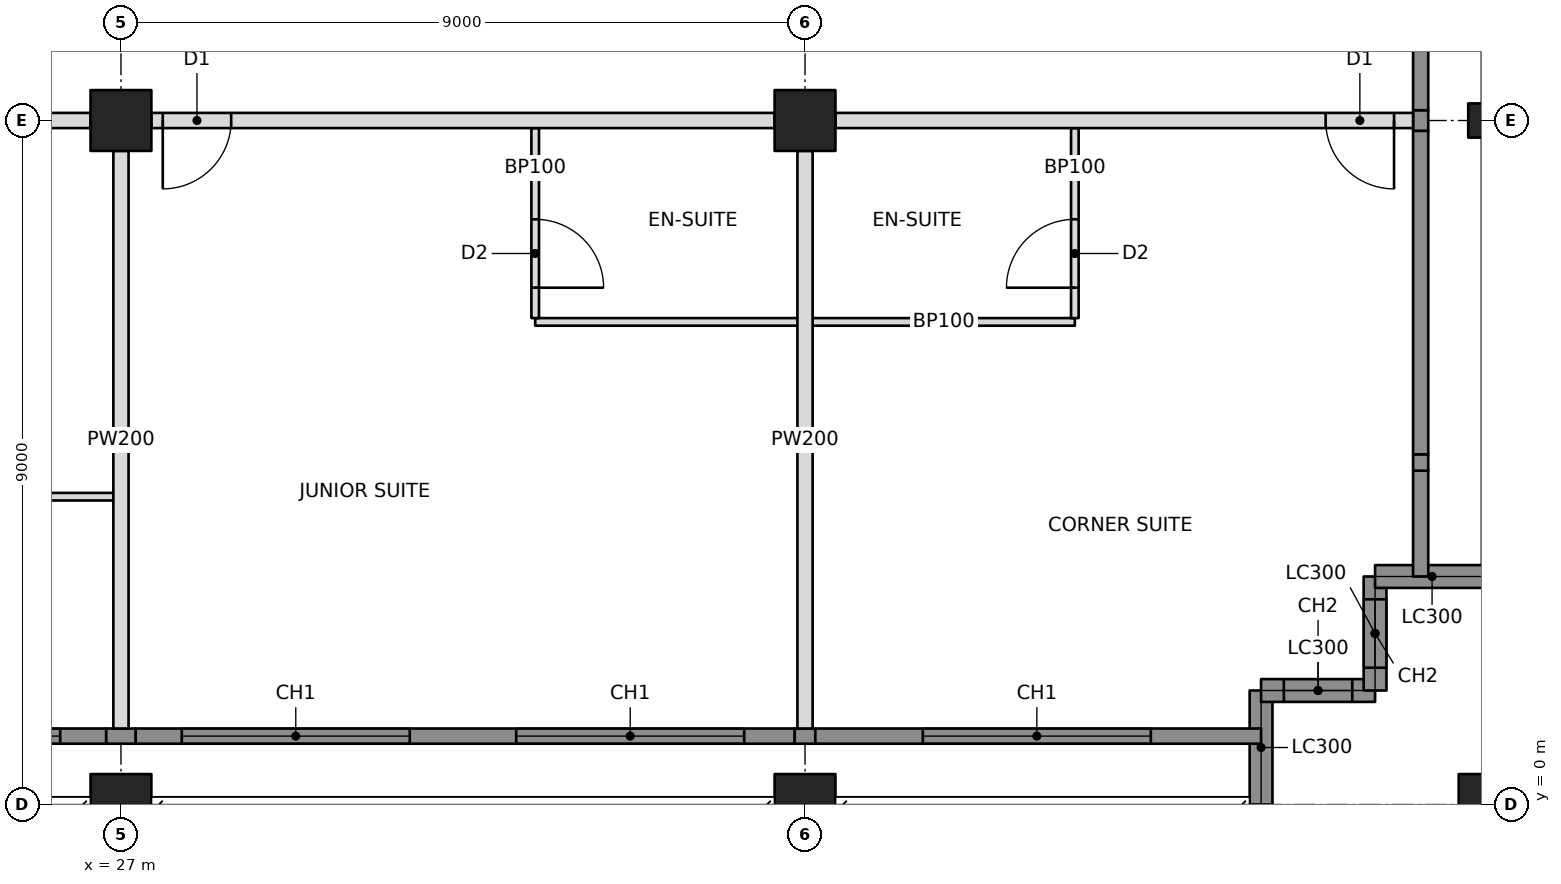
"""IFC4 building model, lengths in metres.
Left out: names, types, materials, properties, quantities, classifications, styles, units other than length and angle.
Written with IfcOpenShell. Run it as: python <this file> out.ifc"""

import sys

from ifc_helpers import new_model, si_unit, direction, frame, frame_2d, origin, origin_2d, place, context, subcontext, project, spatial, rectangle, hollow_rectangle, i_section, extrude, element, fill, save


model = new_model("IFC4")
c1 = context("Model", 3, precision=1e-05, world=origin(), true_north=direction((0.0, 1.0)))
c2 = subcontext(c1, "Body", "Model", "MODEL_VIEW")
j1 = project(units=[si_unit("LENGTHUNIT", "METRE"), si_unit("PLANEANGLEUNIT", "RADIAN")], contexts=[c1])
p1 = place(None, origin())
s1 = spatial("IfcSite", under=j1, at=p1, CompositionType="ELEMENT")
p2 = place(p1, origin())
s2 = spatial("IfcBuilding", under=s1, at=p2, CompositionType="ELEMENT")
p3 = place(p2, frame((0.0, 0.0, 191.0)))
s3 = spatial("IfcBuildingStorey", under=s2, at=p3, CompositionType="ELEMENT", Elevation=191.0)
p4 = place(p3, frame((27.0, 0.0, 0.0), z_axis=(0.0, 0.0, 1.0), x_axis=(1.0, 0.0, 0.0)))
e1 = element("IfcColumn", 1, at=p4, inside=s3, PredefinedType="COLUMN", context=c2, shape_type="SweptSolid", body=[
    extrude(hollow_rectangle(XDim=0.8, YDim=0.8, WallThickness=0.07, at=origin_2d()), origin(), (0.0, 0.0, 1.0), 3.4),
])
p5 = place(p3, frame((27.0, 9.0, 0.0), z_axis=(0.0, 0.0, 1.0), x_axis=(1.0, 0.0, 0.0)))
e2 = element("IfcColumn", 2, at=p5, inside=s3, PredefinedType="COLUMN", context=c2, shape_type="SweptSolid", body=[
    extrude(hollow_rectangle(XDim=0.8, YDim=0.8, WallThickness=0.06, at=origin_2d()), origin(), (0.0, 0.0, 1.0), 3.4),
])
p6 = place(p3, frame((36.0, 0.0, 0.0), z_axis=(0.0, 0.0, 1.0), x_axis=(1.0, 0.0, 0.0)))
e3 = element("IfcColumn", 3, at=p6, inside=s3, PredefinedType="COLUMN", context=c2, shape_type="SweptSolid", body=[
    extrude(hollow_rectangle(XDim=0.8, YDim=0.8, WallThickness=0.07, at=origin_2d()), origin(), (0.0, 0.0, 1.0), 3.4),
])
p7 = place(p3, frame((36.0, 9.0, 0.0), z_axis=(0.0, 0.0, 1.0), x_axis=(0.0, 1.0, 0.0)))
e4 = element("IfcColumn", 4, at=p7, inside=s3, PredefinedType="COLUMN", context=c2, shape_type="SweptSolid", body=[
    extrude(hollow_rectangle(XDim=0.8, YDim=0.8, WallThickness=0.06, at=origin_2d()), origin(), (0.0, 0.0, 1.0), 3.4),
])
p8 = place(p3, frame((45.0, 0.0, 0.0), z_axis=(0.0, 0.0, 1.0), x_axis=(1.0, 0.0, 0.0)))
e5 = element("IfcColumn", 5, at=p8, inside=s3, PredefinedType="COLUMN", context=c2, shape_type="SweptSolid", body=[
    extrude(hollow_rectangle(XDim=0.8, YDim=0.8, WallThickness=0.07, at=origin_2d()), origin(), (0.0, 0.0, 1.0), 3.4),
])
p9 = place(p3, frame((45.0, 9.0, 0.0), z_axis=(0.0, 0.0, 1.0), x_axis=(0.0, 1.0, 0.0)))
e6 = element("IfcColumn", 6, at=p9, inside=s3, PredefinedType="COLUMN", context=c2, shape_type="SweptSolid", body=[
    extrude(i_section(OverallWidth=0.449, OverallDepth=0.549, WebThickness=0.072, FlangeThickness=0.115, at=origin_2d()), origin(), (0.0, 0.0, 1.0), 3.4),
])
p10 = place(p3, frame((42.0, 0.0, 0.0), z_axis=(0.0, 0.0, 1.0), x_axis=(0.0, 1.0, 0.0)))
e7 = element("IfcWall", 7, at=p10, inside=s3, PredefinedType="SOLIDWALL", context=c2, shape_type="SweptSolid", body=[
    extrude(rectangle(XDim=1.5, YDim=0.3, at=frame_2d((0.75, 0.0))), origin(), (0.0, 0.0, 1.0), 2.42),
])
p11 = place(p3, frame((42.0, 1.5, 0.0), z_axis=(0.0, 0.0, 1.0), x_axis=(1.0, 0.0, 0.0)))
e8 = element("IfcWall", 8, at=p11, inside=s3, PredefinedType="SOLIDWALL", context=c2, shape_type="SweptSolid", body=[
    extrude(rectangle(XDim=1.5, YDim=0.3, at=frame_2d((0.75, 0.0))), origin(), (0.0, 0.0, 1.0), 3.2),
])
p12 = place(p11, frame((0.3, 0.0, 0.6)))
e9 = element("IfcOpeningElement", 9, at=p12, cuts=e8, PredefinedType="OPENING", context=c2, shape_type="SweptSolid", body=[
    extrude(rectangle(XDim=0.9, YDim=2.2, at=frame_2d((0.45, 1.1))), frame((0.0, 0.16, 0.0), z_axis=(0.0, -1.0, 0.0), x_axis=(1.0, 0.0, 0.0)), (0.0, 0.0, 1.0), 0.32),
])
p13 = place(p3, frame((43.5, 1.5, 0.0), z_axis=(0.0, 0.0, 1.0), x_axis=(0.0, 1.0, 0.0)))
e10 = element("IfcWall", 10, at=p13, inside=s3, PredefinedType="SOLIDWALL", context=c2, shape_type="SweptSolid", body=[
    extrude(rectangle(XDim=1.5, YDim=0.3, at=frame_2d((0.75, 0.0))), origin(), (0.0, 0.0, 1.0), 3.2),
])
p14 = place(p13, frame((0.3, 0.0, 0.6)))
e11 = element("IfcOpeningElement", 11, at=p14, cuts=e10, PredefinedType="OPENING", context=c2, shape_type="SweptSolid", body=[
    extrude(rectangle(XDim=0.9, YDim=2.2, at=frame_2d((0.45, 1.1))), frame((0.0, 0.16, 0.0), z_axis=(0.0, -1.0, 0.0), x_axis=(1.0, 0.0, 0.0)), (0.0, 0.0, 1.0), 0.32),
])
p15 = place(p3, frame((43.5, 3.0, 0.0), z_axis=(0.0, 0.0, 1.0), x_axis=(1.0, 0.0, 0.0)))
e12 = element("IfcWall", 12, at=p15, inside=s3, PredefinedType="SOLIDWALL", context=c2, shape_type="SweptSolid", body=[
    extrude(rectangle(XDim=1.5, YDim=0.3, at=frame_2d((0.75, 0.0))), origin(), (0.0, 0.0, 1.0), 2.42),
])
p16 = place(p3, frame((44.1, 3.0, 0.0), z_axis=(0.0, 0.0, 1.0), x_axis=(0.0, 1.0, 0.0)))
e13 = element("IfcWall", 13, at=p16, inside=s3, PredefinedType="SOLIDWALL", context=c2, shape_type="SweptSolid", body=[
    extrude(rectangle(XDim=1.393, YDim=0.2, at=frame_2d((0.696, 0.0))), origin(), (0.0, 0.0, 1.0), 3.2),
])
p17 = place(p3, frame((18.4, 9.0, 0.0), z_axis=(0.0, 0.0, 1.0), x_axis=(1.0, 0.0, 0.0)))
e14 = element("IfcWall", 14, at=p17, inside=s3, PredefinedType="PARTITIONING", context=c2, shape_type="SweptSolid", body=[
    extrude(rectangle(XDim=8.2, YDim=0.2, at=frame_2d((4.1, 0.0))), origin(), (0.0, 0.0, 1.0), 2.405),
])
p18 = place(p17, frame((0.15, 0.0, 0.0)))
e15 = element("IfcOpeningElement", 15, at=p18, cuts=e14, PredefinedType="OPENING", context=c2, shape_type="SweptSolid", body=[
    extrude(rectangle(XDim=0.9, YDim=2.1, at=frame_2d((0.45, 1.05))), frame((0.0, 0.11, 0.0), z_axis=(0.0, -1.0, 0.0), x_axis=(1.0, 0.0, 0.0)), (0.0, 0.0, 1.0), 0.22),
])
p19 = place(p3, frame((27.4, 9.0, 0.0), z_axis=(0.0, 0.0, 1.0), x_axis=(1.0, 0.0, 0.0)))
e16 = element("IfcWall", 16, at=p19, inside=s3, PredefinedType="PARTITIONING", context=c2, shape_type="SweptSolid", body=[
    extrude(rectangle(XDim=8.2, YDim=0.2, at=frame_2d((4.1, 0.0))), origin(), (0.0, 0.0, 1.0), 2.405),
])
p20 = place(p19, frame((0.15, 0.0, 0.0)))
e17 = element("IfcOpeningElement", 17, at=p20, cuts=e16, PredefinedType="OPENING", context=c2, shape_type="SweptSolid", body=[
    extrude(rectangle(XDim=0.9, YDim=2.1, at=frame_2d((0.45, 1.05))), frame((0.0, 0.11, 0.0), z_axis=(0.0, -1.0, 0.0), x_axis=(1.0, 0.0, 0.0)), (0.0, 0.0, 1.0), 0.22),
])
p21 = place(p3, frame((36.4, 9.0, 0.0), z_axis=(0.0, 0.0, 1.0), x_axis=(1.0, 0.0, 0.0)))
e18 = element("IfcWall", 18, at=p21, inside=s3, PredefinedType="PARTITIONING", context=c2, shape_type="SweptSolid", body=[
    extrude(rectangle(XDim=7.6, YDim=0.2, at=frame_2d((3.8, 0.0))), origin(), (0.0, 0.0, 1.0), 2.438),
])
p22 = place(p21, frame((6.45, 0.0, 0.0)))
e19 = element("IfcOpeningElement", 19, at=p22, cuts=e18, PredefinedType="OPENING", context=c2, shape_type="SweptSolid", body=[
    extrude(rectangle(XDim=0.9, YDim=2.1, at=frame_2d((0.45, 1.05))), frame((0.0, 0.11, 0.0), z_axis=(0.0, -1.0, 0.0), x_axis=(1.0, 0.0, 0.0)), (0.0, 0.0, 1.0), 0.22),
])
p23 = place(p3, frame((27.0, 8.6, 0.0), z_axis=(0.0, 0.0, 1.0), x_axis=(0.0, -1.0, 0.0)))
e20 = element("IfcWall", 20, at=p23, inside=s3, PredefinedType="PARTITIONING", context=c2, shape_type="SweptSolid", body=[
    extrude(rectangle(XDim=7.6, YDim=0.2, at=frame_2d((3.8, 0.0))), origin(), (0.0, 0.0, 1.0), 2.405),
])
p24 = place(p3, frame((36.0, 8.6, 0.0), z_axis=(0.0, 0.0, 1.0), x_axis=(0.0, -1.0, 0.0)))
e21 = element("IfcWall", 21, at=p24, inside=s3, PredefinedType="PARTITIONING", context=c2, shape_type="SweptSolid", body=[
    extrude(rectangle(XDim=7.6, YDim=0.2, at=frame_2d((3.8, 0.0))), origin(), (0.0, 0.0, 1.0), 2.438),
])
p25 = place(p3, frame((22.5, 4.05, 0.0), z_axis=(0.0, 0.0, 1.0), x_axis=(1.0, 0.0, 0.0)))
e22 = element("IfcWall", 22, at=p25, inside=s3, PredefinedType="PARTITIONING", context=c2, shape_type="SweptSolid", body=[
    extrude(rectangle(XDim=4.4, YDim=0.1, at=frame_2d((2.2, 0.0))), origin(), (0.0, 0.0, 1.0), 2.404),
])
p26 = place(p25, frame((0.5, 0.0, 0.0)))
e23 = element("IfcOpeningElement", 23, at=p26, cuts=e22, PredefinedType="OPENING", context=c2, shape_type="SweptSolid", body=[
    extrude(rectangle(XDim=0.9, YDim=2.1, at=frame_2d((0.45, 1.05))), frame((0.0, 0.06, 0.0), z_axis=(0.0, -1.0, 0.0), x_axis=(1.0, 0.0, 0.0)), (0.0, 0.0, 1.0), 0.12),
])
p27 = place(p3, frame((32.45, 6.35, 0.0), z_axis=(0.0, 0.0, 1.0), x_axis=(1.0, 0.0, 0.0)))
e24 = element("IfcWall", 24, at=p27, inside=s3, PredefinedType="PARTITIONING", context=c2, shape_type="SweptSolid", body=[
    extrude(rectangle(XDim=3.45, YDim=0.1, at=frame_2d((1.725, 0.0))), origin(), (0.0, 0.0, 1.0), 2.438),
])
p28 = place(p3, frame((32.45, 8.9, 0.0), z_axis=(0.0, 0.0, 1.0), x_axis=(0.0, -1.0, 0.0)))
e25 = element("IfcWall", 25, at=p28, inside=s3, PredefinedType="PARTITIONING", context=c2, shape_type="SweptSolid", body=[
    extrude(rectangle(XDim=2.5, YDim=0.1, at=frame_2d((1.25, 0.0))), origin(), (0.0, 0.0, 1.0), 2.404),
])
p29 = place(p28, frame((1.2, 0.0, 0.0)))
e26 = element("IfcOpeningElement", 26, at=p29, cuts=e25, PredefinedType="OPENING", context=c2, shape_type="SweptSolid", body=[
    extrude(rectangle(XDim=0.9, YDim=2.1, at=frame_2d((0.45, 1.05))), frame((0.0, 0.06, 0.0), z_axis=(0.0, -1.0, 0.0), x_axis=(1.0, 0.0, 0.0)), (0.0, 0.0, 1.0), 0.12),
])
p30 = place(p3, frame((36.1, 6.35, 0.0), z_axis=(0.0, 0.0, 1.0), x_axis=(1.0, 0.0, 0.0)))
e27 = element("IfcWall", 27, at=p30, inside=s3, PredefinedType="PARTITIONING", context=c2, shape_type="SweptSolid", body=[
    extrude(rectangle(XDim=3.45, YDim=0.1, at=frame_2d((1.725, 0.0))), origin(), (0.0, 0.0, 1.0), 2.438),
])
p31 = place(p3, frame((39.55, 8.9, 0.0), z_axis=(0.0, 0.0, 1.0), x_axis=(0.0, -1.0, 0.0)))
e28 = element("IfcWall", 28, at=p31, inside=s3, PredefinedType="PARTITIONING", context=c2, shape_type="SweptSolid", body=[
    extrude(rectangle(XDim=2.5, YDim=0.1, at=frame_2d((1.25, 0.0))), origin(), (0.0, 0.0, 1.0), 2.438),
])
p32 = place(p31, frame((1.2, 0.0, 0.0)))
e29 = element("IfcOpeningElement", 29, at=p32, cuts=e28, PredefinedType="OPENING", context=c2, shape_type="SweptSolid", body=[
    extrude(rectangle(XDim=0.9, YDim=2.1, at=frame_2d((0.45, 1.05))), frame((0.0, 0.06, 0.0), z_axis=(0.0, -1.0, 0.0), x_axis=(1.0, 0.0, 0.0)), (0.0, 0.0, 1.0), 0.12),
])
p33 = place(p3, frame((18.194, 0.9, 0.0), z_axis=(0.0, 0.0, 1.0), x_axis=(1.0, 0.0, 0.0)))
e30 = element("IfcWall", 30, at=p33, inside=s3, PredefinedType="SOLIDWALL", context=c2, shape_type="SweptSolid", body=[
    extrude(rectangle(XDim=8.612, YDim=0.2, at=frame_2d((4.306, 0.0))), origin(), (0.0, 0.0, 1.0), 3.2),
])
p34 = place(p33, frame((0.606, 0.0, 0.6)))
e31 = element("IfcOpeningElement", 31, at=p34, cuts=e30, PredefinedType="OPENING", context=c2, shape_type="SweptSolid", body=[
    extrude(rectangle(XDim=3.0, YDim=2.2, at=frame_2d((1.5, 1.1))), frame((0.0, 0.11, 0.0), z_axis=(0.0, -1.0, 0.0), x_axis=(1.0, 0.0, 0.0)), (0.0, 0.0, 1.0), 0.22),
])
p35 = place(p33, frame((5.006, 0.0, 0.6)))
e32 = element("IfcOpeningElement", 32, at=p35, cuts=e30, PredefinedType="OPENING", context=c2, shape_type="SweptSolid", body=[
    extrude(rectangle(XDim=3.0, YDim=2.2, at=frame_2d((1.5, 1.1))), frame((0.0, 0.11, 0.0), z_axis=(0.0, -1.0, 0.0), x_axis=(1.0, 0.0, 0.0)), (0.0, 0.0, 1.0), 0.22),
])
p36 = place(p3, frame((26.806, 0.9, 0.0), z_axis=(0.0, 0.0, 1.0), x_axis=(1.0, 0.0, 0.0)))
e33 = element("IfcWall", 33, at=p36, inside=s3, PredefinedType="SOLIDWALL", context=c2, shape_type="SweptSolid", body=[
    extrude(rectangle(XDim=0.388, YDim=0.2, at=frame_2d((0.194, 0.0))), origin(), (0.0, 0.0, 1.0), 2.404),
])
p37 = place(p3, frame((27.194, 0.9, 0.0), z_axis=(0.0, 0.0, 1.0), x_axis=(1.0, 0.0, 0.0)))
e34 = element("IfcWall", 34, at=p37, inside=s3, PredefinedType="SOLIDWALL", context=c2, shape_type="SweptSolid", body=[
    extrude(rectangle(XDim=8.671, YDim=0.2, at=frame_2d((4.335, 0.0))), origin(), (0.0, 0.0, 1.0), 3.2),
])
p38 = place(p37, frame((0.606, 0.0, 0.6)))
e35 = element("IfcOpeningElement", 35, at=p38, cuts=e34, PredefinedType="OPENING", context=c2, shape_type="SweptSolid", body=[
    extrude(rectangle(XDim=3.0, YDim=2.2, at=frame_2d((1.5, 1.1))), frame((0.0, 0.11, 0.0), z_axis=(0.0, -1.0, 0.0), x_axis=(1.0, 0.0, 0.0)), (0.0, 0.0, 1.0), 0.22),
])
p39 = place(p37, frame((5.006, 0.0, 0.6)))
e36 = element("IfcOpeningElement", 36, at=p39, cuts=e34, PredefinedType="OPENING", context=c2, shape_type="SweptSolid", body=[
    extrude(rectangle(XDim=3.0, YDim=2.2, at=frame_2d((1.5, 1.1))), frame((0.0, 0.11, 0.0), z_axis=(0.0, -1.0, 0.0), x_axis=(1.0, 0.0, 0.0)), (0.0, 0.0, 1.0), 0.22),
])
p40 = place(p3, frame((35.865, 0.9, 0.0), z_axis=(0.0, 0.0, 1.0), x_axis=(1.0, 0.0, 0.0)))
e37 = element("IfcWall", 37, at=p40, inside=s3, PredefinedType="SOLIDWALL", context=c2, shape_type="SweptSolid", body=[
    extrude(rectangle(XDim=0.271, YDim=0.2, at=frame_2d((0.135, 0.0))), origin(), (0.0, 0.0, 1.0), 2.438),
])
p41 = place(p3, frame((36.135, 0.9, 0.0), z_axis=(0.0, 0.0, 1.0), x_axis=(1.0, 0.0, 0.0)))
e38 = element("IfcWall", 38, at=p41, inside=s3, PredefinedType="SOLIDWALL", context=c2, shape_type="SweptSolid", body=[
    extrude(rectangle(XDim=5.865, YDim=0.2, at=frame_2d((2.932, 0.0))), origin(), (0.0, 0.0, 1.0), 3.2),
])
p42 = place(p41, frame((1.415, 0.0, 0.6)))
e39 = element("IfcOpeningElement", 39, at=p42, cuts=e38, PredefinedType="OPENING", context=c2, shape_type="SweptSolid", body=[
    extrude(rectangle(XDim=3.0, YDim=2.2, at=frame_2d((1.5, 1.1))), frame((0.0, 0.11, 0.0), z_axis=(0.0, -1.0, 0.0), x_axis=(1.0, 0.0, 0.0)), (0.0, 0.0, 1.0), 0.22),
])
p43 = place(p3, frame((44.1, 4.393, 0.0), z_axis=(0.0, 0.0, 1.0), x_axis=(0.0, 1.0, 0.0)))
e40 = element("IfcWall", 40, at=p43, inside=s3, PredefinedType="SOLIDWALL", context=c2, shape_type="SweptSolid", body=[
    extrude(rectangle(XDim=0.215, YDim=0.2, at=frame_2d((0.107, 0.0))), origin(), (0.0, 0.0, 1.0), 2.661),
])
p44 = place(p3, frame((44.1, 4.607, 0.0), z_axis=(0.0, 0.0, 1.0), x_axis=(0.0, 1.0, 0.0)))
e41 = element("IfcWall", 41, at=p44, inside=s3, PredefinedType="SOLIDWALL", context=c2, shape_type="SweptSolid", body=[
    extrude(rectangle(XDim=4.257, YDim=0.2, at=frame_2d((2.129, 0.0))), origin(), (0.0, 0.0, 1.0), 3.2),
])
p45 = place(p3, frame((44.1, 8.865, 0.0), z_axis=(0.0, 0.0, 1.0), x_axis=(0.0, 1.0, 0.0)))
e42 = element("IfcWall", 42, at=p45, inside=s3, PredefinedType="SOLIDWALL", context=c2, shape_type="SweptSolid", body=[
    extrude(rectangle(XDim=0.271, YDim=0.2, at=frame_2d((0.135, 0.0))), origin(), (0.0, 0.0, 1.0), 2.438),
])
p46 = place(p3, frame((44.1, 9.135, 0.0), z_axis=(0.0, 0.0, 1.0), x_axis=(0.0, 1.0, 0.0)))
e43 = element("IfcWall", 43, at=p46, inside=s3, PredefinedType="SOLIDWALL", context=c2, shape_type="SweptSolid", body=[
    extrude(rectangle(XDim=8.671, YDim=0.2, at=frame_2d((4.335, 0.0))), origin(), (0.0, 0.0, 1.0), 3.2),
])
p47 = place(p46, frame((2.015, 0.0, 0.6)))
e44 = element("IfcOpeningElement", 44, at=p47, cuts=e43, PredefinedType="OPENING", context=c2, shape_type="SweptSolid", body=[
    extrude(rectangle(XDim=3.0, YDim=2.2, at=frame_2d((1.5, 1.1))), frame((0.0, 0.11, 0.0), z_axis=(0.0, -1.0, 0.0), x_axis=(1.0, 0.0, 0.0)), (0.0, 0.0, 1.0), 0.22),
])
p48 = place(p46, frame((5.515, 0.0, 0.6)))
e45 = element("IfcOpeningElement", 45, at=p48, cuts=e43, PredefinedType="OPENING", context=c2, shape_type="SweptSolid", body=[
    extrude(rectangle(XDim=3.0, YDim=2.2, at=frame_2d((1.5, 1.1))), frame((0.0, 0.11, 0.0), z_axis=(0.0, -1.0, 0.0), x_axis=(1.0, 0.0, 0.0)), (0.0, 0.0, 1.0), 0.22),
])
p49 = place(p12, origin())
e46 = element("IfcWindow", 46, at=p49, inside=s3, PartitioningType="SINGLE_PANEL", PredefinedType="WINDOW", context=c2, shape_type="SweptSolid", body=[
    extrude(rectangle(XDim=0.9, YDim=2.2, at=frame_2d((0.45, 1.1))), frame((0.0, 0.03, 0.0), z_axis=(0.0, -1.0, 0.0), x_axis=(1.0, 0.0, 0.0)), (0.0, 0.0, 1.0), 0.06),
])
fill(e9, e46)
p50 = place(p14, origin())
e47 = element("IfcWindow", 47, at=p50, inside=s3, PartitioningType="SINGLE_PANEL", PredefinedType="WINDOW", context=c2, shape_type="SweptSolid", body=[
    extrude(rectangle(XDim=0.9, YDim=2.2, at=frame_2d((0.45, 1.1))), frame((0.0, 0.03, 0.0), z_axis=(0.0, -1.0, 0.0), x_axis=(1.0, 0.0, 0.0)), (0.0, 0.0, 1.0), 0.06),
])
fill(e11, e47)
p51 = place(p35, origin())
e48 = element("IfcWindow", 48, at=p51, inside=s3, PartitioningType="TRIPLE_PANEL_VERTICAL", PredefinedType="WINDOW", context=c2, shape_type="SweptSolid", body=[
    extrude(rectangle(XDim=3.0, YDim=2.2, at=frame_2d((1.5, 1.1))), frame((0.0, 0.03, 0.0), z_axis=(0.0, -1.0, 0.0), x_axis=(1.0, 0.0, 0.0)), (0.0, 0.0, 1.0), 0.06),
])
fill(e32, e48)
p52 = place(p38, origin())
e49 = element("IfcWindow", 49, at=p52, inside=s3, PartitioningType="TRIPLE_PANEL_VERTICAL", PredefinedType="WINDOW", context=c2, shape_type="SweptSolid", body=[
    extrude(rectangle(XDim=3.0, YDim=2.2, at=frame_2d((1.5, 1.1))), frame((0.0, 0.03, 0.0), z_axis=(0.0, -1.0, 0.0), x_axis=(1.0, 0.0, 0.0)), (0.0, 0.0, 1.0), 0.06),
])
fill(e35, e49)
p53 = place(p39, origin())
e50 = element("IfcWindow", 50, at=p53, inside=s3, PartitioningType="TRIPLE_PANEL_VERTICAL", PredefinedType="WINDOW", context=c2, shape_type="SweptSolid", body=[
    extrude(rectangle(XDim=3.0, YDim=2.2, at=frame_2d((1.5, 1.1))), frame((0.0, 0.03, 0.0), z_axis=(0.0, -1.0, 0.0), x_axis=(1.0, 0.0, 0.0)), (0.0, 0.0, 1.0), 0.06),
])
fill(e36, e50)
p54 = place(p42, origin())
e51 = element("IfcWindow", 51, at=p54, inside=s3, PartitioningType="TRIPLE_PANEL_VERTICAL", PredefinedType="WINDOW", context=c2, shape_type="SweptSolid", body=[
    extrude(rectangle(XDim=3.0, YDim=2.2, at=frame_2d((1.5, 1.1))), frame((0.0, 0.03, 0.0), z_axis=(0.0, -1.0, 0.0), x_axis=(1.0, 0.0, 0.0)), (0.0, 0.0, 1.0), 0.06),
])
fill(e39, e51)
p55 = place(p29, origin())
e52 = element("IfcDoor", 52, at=p55, inside=s3, OperationType="SINGLE_SWING_RIGHT", PredefinedType="DOOR", context=c2, shape_type="SweptSolid", body=[
    extrude(rectangle(XDim=0.9, YDim=2.1, at=frame_2d((0.45, 1.05))), frame((0.0, 0.025, 0.0), z_axis=(0.0, -1.0, 0.0), x_axis=(1.0, 0.0, 0.0)), (0.0, 0.0, 1.0), 0.05),
])
fill(e26, e52)
p56 = place(p20, frame((0.9, 0.0, 0.0), z_axis=(0.0, 0.0, 1.0), x_axis=(-1.0, 0.0, 0.0)))
e53 = element("IfcDoor", 53, at=p56, inside=s3, OperationType="SINGLE_SWING_RIGHT", PredefinedType="DOOR", context=c2, shape_type="SweptSolid", body=[
    extrude(rectangle(XDim=0.9, YDim=2.1, at=frame_2d((0.45, 1.05))), frame((0.0, 0.025, 0.0), z_axis=(0.0, -1.0, 0.0), x_axis=(1.0, 0.0, 0.0)), (0.0, 0.0, 1.0), 0.05),
])
fill(e17, e53)
p57 = place(p32, frame((0.9, 0.0, 0.0), z_axis=(0.0, 0.0, 1.0), x_axis=(-1.0, 0.0, 0.0)))
e54 = element("IfcDoor", 54, at=p57, inside=s3, OperationType="SINGLE_SWING_LEFT", PredefinedType="DOOR", context=c2, shape_type="SweptSolid", body=[
    extrude(rectangle(XDim=0.9, YDim=2.1, at=frame_2d((0.45, 1.05))), frame((0.0, 0.025, 0.0), z_axis=(0.0, -1.0, 0.0), x_axis=(1.0, 0.0, 0.0)), (0.0, 0.0, 1.0), 0.05),
])
fill(e29, e54)
p58 = place(p22, frame((0.9, 0.0, 0.0), z_axis=(0.0, 0.0, 1.0), x_axis=(-1.0, 0.0, 0.0)))
e55 = element("IfcDoor", 55, at=p58, inside=s3, OperationType="SINGLE_SWING_LEFT", PredefinedType="DOOR", context=c2, shape_type="SweptSolid", body=[
    extrude(rectangle(XDim=0.9, YDim=2.1, at=frame_2d((0.45, 1.05))), frame((0.0, 0.025, 0.0), z_axis=(0.0, -1.0, 0.0), x_axis=(1.0, 0.0, 0.0)), (0.0, 0.0, 1.0), 0.05),
])
fill(e19, e55)
save(model, sys.argv[1])
